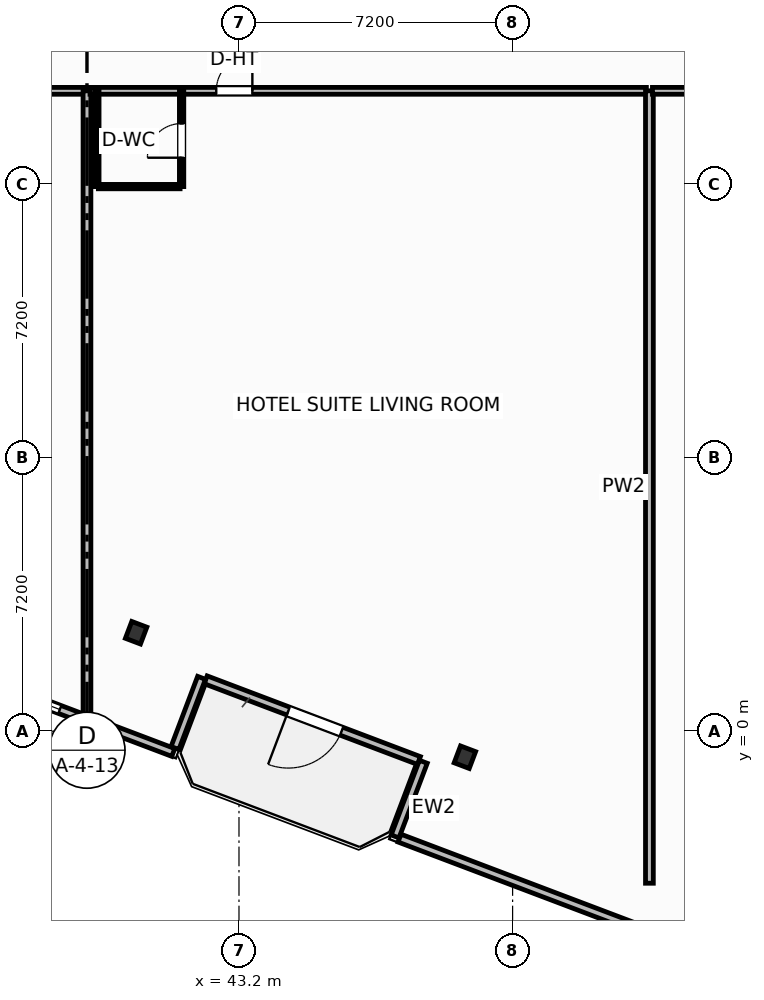
"""IFC4 building model, lengths in metres.
Left out: names, types, materials, properties, quantities, classifications, styles, units other than length and angle.
Written with IfcOpenShell. Run it as: python <this file> out.ifc"""

import sys

from ifc_helpers import new_model, si_unit, direction, frame, frame_2d, origin, origin_2d, place, context, subcontext, project, spatial, rectangle, i_section, extrude, element, fill, save


model = new_model("IFC4")
c1 = context("Model", 3, precision=1e-05, world=origin(), true_north=direction((0.0, 1.0)))
c2 = subcontext(c1, "Body", "Model", "MODEL_VIEW")
j1 = project(units=[si_unit("LENGTHUNIT", "METRE"), si_unit("PLANEANGLEUNIT", "RADIAN")], contexts=[c1])
p1 = place(None, origin())
s1 = spatial("IfcSite", under=j1, at=p1, CompositionType="ELEMENT")
p2 = place(p1, origin())
s2 = spatial("IfcBuilding", under=s1, at=p2, CompositionType="ELEMENT")
p3 = place(p2, frame((0.0, 0.0, 98.4)))
s3 = spatial("IfcBuildingStorey", under=s2, at=p3, CompositionType="ELEMENT", Elevation=98.4)
for number, where, z_axis, x_axis in (
    (1, (40.493, 2.591, 0.0), (0.0, 0.0, 1.0), (0.935, -0.354, 0.0)),
    (2, (49.144, -0.684, 0.0), (0.0, 0.0, 1.0), (0.935, -0.354, 0.0)),
):
    element("IfcColumn", number, at=place(p3, frame(where, z_axis=z_axis, x_axis=x_axis)), inside=s3, PredefinedType="COLUMN", context=c2, shape_type="SweptSolid", body=[
        extrude(i_section(OverallWidth=0.424, OverallDepth=0.474, WebThickness=0.048, FlangeThickness=0.077, FilletRadius=0.025, at=origin_2d()), origin(), (0.0, 0.0, 1.0), 3.7),
    ])
p4 = place(p3, frame((47.935, -0.771, 0.0), z_axis=(0.0, 0.0, 1.0), x_axis=(-0.935227640088, 0.354046976001, 0.0)))
e3 = element("IfcWall", 3, at=p4, inside=s3, PredefinedType="SOLIDWALL", context=c2, shape_type="SweptSolid", body=[
    extrude(rectangle(XDim=6.0, YDim=0.22, at=frame_2d((3.0, 0.0))), origin(), (0.0, 0.0, 1.0), 2.73),
])
p5 = place(p4, frame((2.176, 0.0, 0.0)))
e4 = element("IfcOpeningElement", 4, at=p5, cuts=e3, PredefinedType="OPENING", context=c2, shape_type="SweptSolid", body=[
    extrude(rectangle(XDim=1.5, YDim=2.25, at=frame_2d((0.75, 1.125))), frame((0.0, 0.12, 0.0), z_axis=(0.0, -1.0, 0.0), x_axis=(1.0, 0.0, 0.0)), (0.0, 0.0, 1.0), 0.24),
])
p6 = place(p3, frame((33.957, 2.286, 0.0), z_axis=(0.0, 0.0, 1.0), x_axis=(0.935220736163, -0.354065212427, 0.0)))
e5 = element("IfcWall", 5, at=p6, inside=s3, PredefinedType="SOLIDWALL", context=c2, shape_type="SweptSolid", body=[
    extrude(rectangle(XDim=8.035, YDim=0.22, at=frame_2d((4.018, 0.0))), origin(), (0.0, 0.0, 1.0), 2.73),
])
p7 = place(p6, frame((3.192, 0.0, 0.8)))
e6 = element("IfcOpeningElement", 6, at=p7, cuts=e5, PredefinedType="OPENING", context=c2, shape_type="SweptSolid", body=[
    extrude(rectangle(XDim=1.65, YDim=1.65, at=frame_2d((0.825, 0.825))), frame((0.0, 0.12, 0.0), z_axis=(0.0, -1.0, 0.0), x_axis=(1.0, 0.0, 0.0)), (0.0, 0.0, 1.0), 0.24),
])
p8 = place(p3, frame((41.516, -0.442, 0.0), z_axis=(0.0, 0.0, 1.0), x_axis=(0.354061611705, 0.935222099352, 0.0)))
e7 = element("IfcWall", 7, at=p8, inside=s3, PredefinedType="SOLIDWALL", context=c2, shape_type="SweptSolid", body=[
    extrude(rectangle(XDim=1.975, YDim=0.22, at=frame_2d((0.987, 0.0))), origin(), (0.0, 0.0, 1.0), 2.73),
])
p9 = place(p3, frame((48.051, -0.805, 0.0), z_axis=(0.0, 0.0, 1.0), x_axis=(-0.353988291547, -0.935249854022, 0.0)))
e8 = element("IfcWall", 8, at=p9, inside=s3, PredefinedType="SOLIDWALL", context=c2, shape_type="SweptSolid", body=[
    extrude(rectangle(XDim=2.1, YDim=0.22, at=frame_2d((1.05, 0.0))), origin(), (0.0, 0.0, 1.0), 2.73),
])
p10 = place(p3, frame((47.424, -2.813, 0.0), z_axis=(0.0, 0.0, 1.0), x_axis=(0.935225962032, -0.354051408614, 0.0)))
e9 = element("IfcWall", 9, at=p10, inside=s3, PredefinedType="SOLIDWALL", context=c2, shape_type="SweptSolid", body=[
    extrude(rectangle(XDim=14.347, YDim=0.22, at=frame_2d((7.173, 0.0))), origin(), (0.0, 0.0, 1.0), 2.73),
])
p11 = place(p10, frame((6.348, 0.0, 0.8)))
e10 = element("IfcOpeningElement", 10, at=p11, cuts=e9, PredefinedType="OPENING", context=c2, shape_type="SweptSolid", body=[
    extrude(rectangle(XDim=1.65, YDim=1.65, at=frame_2d((0.825, 0.825))), frame((0.0, 0.12, 0.0), z_axis=(0.0, -1.0, 0.0), x_axis=(1.0, 0.0, 0.0)), (0.0, 0.0, 1.0), 0.24),
])
p12 = place(p3, frame((24.08, 16.85, 0.0), z_axis=(0.0, 0.0, 1.0), x_axis=(1.0, 0.0, 0.0)))
e11 = element("IfcWall", 11, at=p12, inside=s3, PredefinedType="PARTITIONING", context=c2, shape_type="SweptSolid", body=[
    extrude(rectangle(XDim=15.04, YDim=0.18, at=frame_2d((7.52, 0.0))), origin(), (0.0, 0.0, 1.0), 3.45),
])
p13 = place(p12, frame((7.045, 0.0, 0.0)))
e12 = element("IfcOpeningElement", 12, at=p13, cuts=e11, PredefinedType="OPENING", context=c2, shape_type="SweptSolid", body=[
    extrude(rectangle(XDim=0.95, YDim=2.05, at=frame_2d((0.475, 1.025))), frame((0.0, 0.1, 0.0), z_axis=(0.0, -1.0, 0.0), x_axis=(1.0, 0.0, 0.0)), (0.0, 0.0, 1.0), 0.2),
])
p14 = place(p3, frame((39.2, 0.322, 0.0), z_axis=(0.0, 0.0, 1.0), x_axis=(0.0, 1.0, 0.0)))
e13 = element("IfcWall", 13, at=p14, inside=s3, PredefinedType="PARTITIONING", context=c2, shape_type="SweptSolid", body=[
    extrude(rectangle(XDim=16.528, YDim=0.205, at=frame_2d((8.264, 0.0))), origin(), (0.0, 0.0, 1.0), 3.45),
])
p15 = place(p3, frame((39.28, 16.85, 0.0), z_axis=(0.0, 0.0, 1.0), x_axis=(1.0, 0.0, 0.0)))
e14 = element("IfcWall", 14, at=p15, inside=s3, PredefinedType="PARTITIONING", context=c2, shape_type="SweptSolid", body=[
    extrude(rectangle(XDim=14.64, YDim=0.18, at=frame_2d((7.32, 0.0))), origin(), (0.0, 0.0, 1.0), 3.45),
])
p16 = place(p15, frame((3.322, 0.0, 0.0)))
e15 = element("IfcOpeningElement", 15, at=p16, cuts=e14, PredefinedType="OPENING", context=c2, shape_type="SweptSolid", body=[
    extrude(rectangle(XDim=0.95, YDim=2.15, at=frame_2d((0.475, 1.075))), frame((0.0, 0.1, 0.0), z_axis=(0.0, -1.0, 0.0), x_axis=(1.0, 0.0, 0.0)), (0.0, 0.0, 1.0), 0.2),
])
p17 = place(p3, frame((39.5, 14.33, 0.0), z_axis=(0.0, 0.0, 1.0), x_axis=(1.0, 0.0, 0.0)))
e16 = element("IfcWall", 16, at=p17, inside=s3, PredefinedType="PARTITIONING", context=c2, shape_type="SweptSolid", body=[
    extrude(rectangle(XDim=2.15, YDim=0.115, at=frame_2d((1.075, 0.0))), origin(), (0.0, 0.0, 1.0), 3.45),
])
p18 = place(p3, frame((41.69, 14.33, 0.0), z_axis=(0.0, 0.0, 1.0), x_axis=(0.0, 1.0, 0.0)))
e17 = element("IfcWall", 17, at=p18, inside=s3, PredefinedType="PARTITIONING", context=c2, shape_type="SweptSolid", body=[
    extrude(rectangle(XDim=2.52, YDim=0.115, at=frame_2d((1.26, 0.0))), origin(), (0.0, 0.0, 1.0), 3.45),
])
p19 = place(p18, frame((0.76, 0.0, 0.0)))
e18 = element("IfcOpeningElement", 18, at=p19, cuts=e17, PredefinedType="OPENING", context=c2, shape_type="SweptSolid", body=[
    extrude(rectangle(XDim=0.9, YDim=2.05, at=frame_2d((0.45, 1.025))), frame((0.0, 0.067, 0.0), z_axis=(0.0, -1.0, 0.0), x_axis=(1.0, 0.0, 0.0)), (0.0, 0.0, 1.0), 0.135),
])
p20 = place(p3, frame((39.46, 14.33, 0.0), z_axis=(0.0, 0.0, 1.0), x_axis=(0.0, 1.0, 0.0)))
e19 = element("IfcWall", 19, at=p20, inside=s3, PredefinedType="PARTITIONING", context=c2, shape_type="SweptSolid", body=[
    extrude(rectangle(XDim=2.52, YDim=0.115, at=frame_2d((1.26, 0.0))), origin(), (0.0, 0.0, 1.0), 3.45),
])
p21 = place(p3, frame((54.0, -4.0, 0.0), z_axis=(0.0, 0.0, 1.0), x_axis=(0.0, 1.0, 0.0)))
e20 = element("IfcWall", 20, at=p21, inside=s3, PredefinedType="PARTITIONING", context=c2, shape_type="SweptSolid", body=[
    extrude(rectangle(XDim=20.85, YDim=0.205, at=frame_2d((10.425, 0.0))), origin(), (0.0, 0.0, 1.0), 3.45),
])
p22 = place(p3, frame((54.08, 16.85, 0.0), z_axis=(0.0, 0.0, 1.0), x_axis=(1.0, 0.0, 0.0)))
e21 = element("IfcWall", 21, at=p22, inside=s3, PredefinedType="PARTITIONING", context=c2, shape_type="SweptSolid", body=[
    extrude(rectangle(XDim=21.722, YDim=0.18, at=frame_2d((10.861, 0.0))), origin(), (0.0, 0.0, 1.0), 2.58),
])
p23 = place(p22, frame((0.934, 0.0, 0.0)))
e22 = element("IfcOpeningElement", 22, at=p23, cuts=e21, PredefinedType="OPENING", context=c2, shape_type="SweptSolid", body=[
    extrude(rectangle(XDim=0.95, YDim=2.15, at=frame_2d((0.475, 1.075))), frame((0.0, 0.1, 0.0), z_axis=(0.0, -1.0, 0.0), x_axis=(1.0, 0.0, 0.0)), (0.0, 0.0, 1.0), 0.2),
])
p24 = place(p5, origin())
e23 = element("IfcDoor", 23, at=p24, inside=s3, OperationType="SINGLE_SWING_RIGHT", PredefinedType="DOOR", context=c2, shape_type="SweptSolid", body=[
    extrude(rectangle(XDim=1.5, YDim=2.25, at=frame_2d((0.75, 1.125))), frame((0.0, 0.025, 0.0), z_axis=(0.0, -1.0, 0.0), x_axis=(1.0, 0.0, 0.0)), (0.0, 0.0, 1.0), 0.05),
])
fill(e4, e23)
p25 = place(p7, origin())
e24 = element("IfcWindow", 24, at=p25, inside=s3, PartitioningType="SINGLE_PANEL", PredefinedType="WINDOW", context=c2, shape_type="SweptSolid", body=[
    extrude(rectangle(XDim=1.65, YDim=1.65, at=frame_2d((0.825, 0.825))), frame((0.0, 0.03, 0.0), z_axis=(0.0, -1.0, 0.0), x_axis=(1.0, 0.0, 0.0)), (0.0, 0.0, 1.0), 0.06),
])
fill(e6, e24)
p26 = place(p16, origin())
e25 = element("IfcDoor", 25, at=p26, inside=s3, OperationType="SINGLE_SWING_RIGHT", PredefinedType="DOOR", context=c2, shape_type="SweptSolid", body=[
    extrude(rectangle(XDim=0.95, YDim=2.15, at=frame_2d((0.475, 1.075))), frame((0.0, 0.025, 0.0), z_axis=(0.0, -1.0, 0.0), x_axis=(1.0, 0.0, 0.0)), (0.0, 0.0, 1.0), 0.05),
])
fill(e15, e25)
p27 = place(p19, origin())
e26 = element("IfcDoor", 26, at=p27, inside=s3, OperationType="SINGLE_SWING_LEFT", PredefinedType="DOOR", context=c2, shape_type="SweptSolid", body=[
    extrude(rectangle(XDim=0.9, YDim=2.05, at=frame_2d((0.45, 1.025))), frame((0.0, 0.025, 0.0), z_axis=(0.0, -1.0, 0.0), x_axis=(1.0, 0.0, 0.0)), (0.0, 0.0, 1.0), 0.05),
])
fill(e18, e26)
save(model, sys.argv[1])
